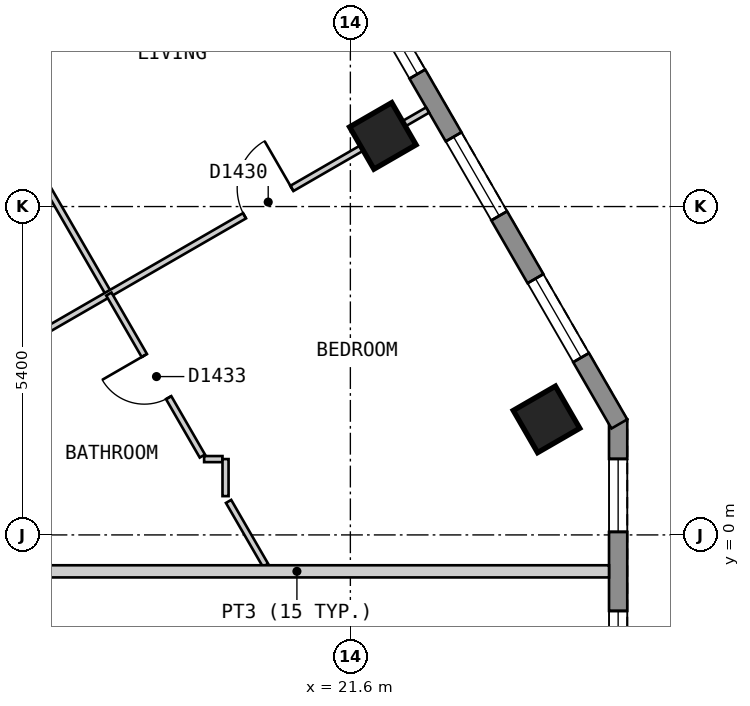
"""IFC4 building model, lengths in metres.
Left out: names, types, materials, properties, quantities, classifications, styles, units other than length and angle.
Written with IfcOpenShell. Run it as: python <this file> out.ifc"""

import sys

from ifc_helpers import new_model, si_unit, direction, frame, frame_2d, origin, origin_2d, place, context, subcontext, project, spatial, polyline, rectangle, outline, extrude, element, fill, save


model = new_model("IFC4")
c1 = context("Model", 3, precision=1e-05, world=origin(), true_north=direction((0.0, 1.0)))
c2 = subcontext(c1, "Body", "Model", "MODEL_VIEW")
j1 = project(units=[si_unit("LENGTHUNIT", "METRE"), si_unit("PLANEANGLEUNIT", "RADIAN")], contexts=[c1])
p1 = place(None, origin())
s1 = spatial("IfcSite", under=j1, at=p1, CompositionType="ELEMENT")
p2 = place(p1, origin())
s2 = spatial("IfcBuilding", under=s1, at=p2, CompositionType="ELEMENT")
p3 = place(p2, frame((0.0, 0.0, 166.2)))
s3 = spatial("IfcBuildingStorey", under=s2, at=p3, CompositionType="ELEMENT", Elevation=166.2)
for number, where, z_axis, x_axis in (
    (1, (24.826, 1.9, 0.0), (0.0, 0.0, 1.0), (-0.5, 0.866, 0.0)),
    (2, (22.134, 6.562, 0.0), (0.0, 0.0, 1.0), (-0.5, 0.866, 0.0)),
):
    element("IfcColumn", number, at=place(p3, frame(where, z_axis=z_axis, x_axis=x_axis)), inside=s3, PredefinedType="COLUMN", context=c2, shape_type="SweptSolid", body=[
        extrude(rectangle(XDim=0.8, YDim=0.8, at=origin_2d()), origin(), (0.0, 0.0, 1.0), 3.0),
    ])
p4 = place(p3, frame((26.004, -3.1, 0.0), z_axis=(0.0, 0.0, 1.0), x_axis=(0.0, 1.0, 0.0)))
e3 = element("IfcWall", 3, at=p4, inside=s3, PredefinedType="SOLIDWALL", context=c2, shape_type="SweptSolid", body=[
    extrude(outline(polyline([(0.0, -0.15), (5.0, -0.15), (4.92, 0.15), (0.08, 0.15), (0.0, -0.15)])), origin(), (0.0, 0.0, 1.0), 2.7),
])
p5 = place(p4, frame((0.65, 0.0, 0.15)))
e4 = element("IfcOpeningElement", 4, at=p5, cuts=e3, PredefinedType="OPENING", context=c2, shape_type="SweptSolid", body=[
    extrude(rectangle(XDim=1.2, YDim=2.1, at=frame_2d((0.6, 1.05))), frame((0.0, 0.16, 0.0), z_axis=(0.0, -1.0, 0.0), x_axis=(1.0, 0.0, 0.0)), (0.0, 0.0, 1.0), 0.32),
])
p6 = place(p4, frame((3.15, 0.0, 0.15)))
e5 = element("IfcOpeningElement", 5, at=p6, cuts=e3, PredefinedType="OPENING", context=c2, shape_type="SweptSolid", body=[
    extrude(rectangle(XDim=1.2, YDim=2.1, at=frame_2d((0.6, 1.05))), frame((0.0, 0.16, 0.0), z_axis=(0.0, -1.0, 0.0), x_axis=(1.0, 0.0, 0.0)), (0.0, 0.0, 1.0), 0.32),
])
p7 = place(p3, frame((26.024, 1.825, 0.0), z_axis=(0.0, 0.0, 1.0), x_axis=(-0.500010537973, 0.866019319597, 0.0)))
e6 = element("IfcWall", 6, at=p7, inside=s3, PredefinedType="SOLIDWALL", context=c2, shape_type="SweptSolid", body=[
    extrude(outline(polyline([(0.0, -0.15), (22.863, -0.15), (22.783, 0.15), (0.08, 0.15), (0.0, -0.15)])), origin(), (0.0, 0.0, 1.0), 2.7),
])
p8 = place(p7, frame((1.259, 0.0, 0.15)))
e7 = element("IfcOpeningElement", 7, at=p8, cuts=e6, PredefinedType="OPENING", context=c2, shape_type="SweptSolid", body=[
    extrude(rectangle(XDim=1.5, YDim=2.1, at=frame_2d((0.75, 1.05))), frame((0.0, 0.16, 0.0), z_axis=(0.0, -1.0, 0.0), x_axis=(1.0, 0.0, 0.0)), (0.0, 0.0, 1.0), 0.32),
])
p9 = place(p7, frame((3.952, 0.0, 0.15)))
e8 = element("IfcOpeningElement", 8, at=p9, cuts=e6, PredefinedType="OPENING", context=c2, shape_type="SweptSolid", body=[
    extrude(rectangle(XDim=1.5, YDim=2.1, at=frame_2d((0.75, 1.05))), frame((0.0, 0.16, 0.0), z_axis=(0.0, -1.0, 0.0), x_axis=(1.0, 0.0, 0.0)), (0.0, 0.0, 1.0), 0.32),
])
p10 = place(p7, frame((6.644, 0.0, 0.15)))
e9 = element("IfcOpeningElement", 9, at=p10, cuts=e6, PredefinedType="OPENING", context=c2, shape_type="SweptSolid", body=[
    extrude(rectangle(XDim=1.5, YDim=2.1, at=frame_2d((0.75, 1.05))), frame((0.0, 0.16, 0.0), z_axis=(0.0, -1.0, 0.0), x_axis=(1.0, 0.0, 0.0)), (0.0, 0.0, 1.0), 0.32),
])
p11 = place(p7, frame((9.335, 0.0, 0.15)))
e10 = element("IfcOpeningElement", 10, at=p11, cuts=e6, PredefinedType="OPENING", context=c2, shape_type="SweptSolid", body=[
    extrude(rectangle(XDim=1.5, YDim=2.1, at=frame_2d((0.75, 1.05))), frame((0.0, 0.16, 0.0), z_axis=(0.0, -1.0, 0.0), x_axis=(1.0, 0.0, 0.0)), (0.0, 0.0, 1.0), 0.32),
])
p12 = place(p7, frame((12.028, 0.0, 0.15)))
e11 = element("IfcOpeningElement", 11, at=p12, cuts=e6, PredefinedType="OPENING", context=c2, shape_type="SweptSolid", body=[
    extrude(rectangle(XDim=1.5, YDim=2.1, at=frame_2d((0.75, 1.05))), frame((0.0, 0.16, 0.0), z_axis=(0.0, -1.0, 0.0), x_axis=(1.0, 0.0, 0.0)), (0.0, 0.0, 1.0), 0.32),
])
p13 = place(p7, frame((14.72, 0.0, 0.15)))
e12 = element("IfcOpeningElement", 12, at=p13, cuts=e6, PredefinedType="OPENING", context=c2, shape_type="SweptSolid", body=[
    extrude(rectangle(XDim=1.5, YDim=2.1, at=frame_2d((0.75, 1.05))), frame((0.0, 0.16, 0.0), z_axis=(0.0, -1.0, 0.0), x_axis=(1.0, 0.0, 0.0)), (0.0, 0.0, 1.0), 0.32),
])
p14 = place(p7, frame((17.411, 0.0, 0.15)))
e13 = element("IfcOpeningElement", 13, at=p14, cuts=e6, PredefinedType="OPENING", context=c2, shape_type="SweptSolid", body=[
    extrude(rectangle(XDim=1.5, YDim=2.1, at=frame_2d((0.75, 1.05))), frame((0.0, 0.16, 0.0), z_axis=(0.0, -1.0, 0.0), x_axis=(1.0, 0.0, 0.0)), (0.0, 0.0, 1.0), 0.32),
])
p15 = place(p7, frame((20.104, 0.0, 0.15)))
e14 = element("IfcOpeningElement", 14, at=p15, cuts=e6, PredefinedType="OPENING", context=c2, shape_type="SweptSolid", body=[
    extrude(rectangle(XDim=1.5, YDim=2.1, at=frame_2d((0.75, 1.05))), frame((0.0, 0.16, 0.0), z_axis=(0.0, -1.0, 0.0), x_axis=(1.0, 0.0, 0.0)), (0.0, 0.0, 1.0), 0.32),
])
p16 = place(p3, frame((15.412, 7.8, 0.0), z_axis=(0.0, 0.0, 1.0), x_axis=(0.499882970317, -0.866092960361, 0.0)))
e15 = element("IfcWall", 15, at=p16, inside=s3, PredefinedType="PARTITIONING", context=c2, shape_type="SweptSolid", body=[
    extrude(rectangle(XDim=4.433, YDim=0.1, at=frame_2d((2.216, 0.0))), origin(), (0.0, 0.0, 1.0), 2.7),
])
p17 = place(p3, frame((19.597, 0.551, 0.0), z_axis=(0.0, 0.0, 1.0), x_axis=(0.500576018574, -0.86569258379, 0.0)))
e16 = element("IfcWall", 16, at=p17, inside=s3, PredefinedType="PARTITIONING", context=c2, shape_type="SweptSolid", body=[
    extrude(rectangle(XDim=1.213, YDim=0.1, at=frame_2d((0.606, 0.0))), origin(), (0.0, 0.0, 1.0), 2.7),
])
p18 = place(p3, frame((19.195, 1.247, 0.0), z_axis=(0.0, 0.0, 1.0), x_axis=(1.0, 0.0, 0.0)))
e17 = element("IfcWall", 17, at=p18, inside=s3, PredefinedType="PARTITIONING", context=c2, shape_type="SweptSolid", body=[
    extrude(rectangle(XDim=0.302, YDim=0.1, at=frame_2d((0.151, 0.0))), origin(), (0.0, 0.0, 1.0), 2.7),
])
p19 = place(p3, frame((19.547, 0.638, 0.0), z_axis=(0.0, 0.0, 1.0), x_axis=(0.0, 1.0, 0.0)))
e18 = element("IfcWall", 18, at=p19, inside=s3, PredefinedType="PARTITIONING", context=c2, shape_type="SweptSolid", body=[
    extrude(rectangle(XDim=0.609, YDim=0.1, at=frame_2d((0.305, 0.0))), origin(), (0.0, 0.0, 1.0), 2.7),
])
p20 = place(p3, frame((14.21, 1.987, 0.0), z_axis=(0.0, 0.0, 1.0), x_axis=(0.866022959057, 0.500004234368, 0.0)))
e19 = element("IfcWall", 19, at=p20, inside=s3, PredefinedType="PARTITIONING", context=c2, shape_type="SweptSolid", body=[
    extrude(rectangle(XDim=10.0, YDim=0.1, at=frame_2d((5.0, 0.0))), origin(), (0.0, 0.0, 1.0), 2.7),
])
p21 = place(p20, frame((6.523, 0.0, 0.0)))
e20 = element("IfcOpeningElement", 20, at=p21, cuts=e19, PredefinedType="OPENING", context=c2, shape_type="SweptSolid", body=[
    extrude(rectangle(XDim=0.9, YDim=2.1, at=frame_2d((0.45, 1.05))), frame((0.0, 0.06, 0.0), z_axis=(0.0, -1.0, 0.0), x_axis=(1.0, 0.0, 0.0)), (0.0, 0.0, 1.0), 0.12),
])
p22 = place(p3, frame((15.588, -0.599, 0.0), z_axis=(0.0, 0.0, 1.0), x_axis=(1.0, 0.0, 0.0)))
e21 = element("IfcWall", 21, at=p22, inside=s3, PredefinedType="PARTITIONING", context=c2, shape_type="SweptSolid", body=[
    extrude(rectangle(XDim=10.266, YDim=0.2, at=frame_2d((5.133, 0.0))), origin(), (0.0, 0.0, 1.0), 2.7),
])
p23 = place(p3, frame((17.628, 3.961, 0.0), z_axis=(0.0, 0.0, 1.0), x_axis=(0.50003162148, -0.866007146345, 0.0)))
e22 = element("IfcWall", 22, at=p23, inside=s3, PredefinedType="PARTITIONING", context=c2, shape_type="SweptSolid", body=[
    extrude(rectangle(XDim=3.076, YDim=0.1, at=frame_2d((1.538, 0.0))), origin(), (0.0, 0.0, 1.0), 2.7),
])
p24 = place(p23, frame((1.167, 0.0, 0.0)))
e23 = element("IfcOpeningElement", 23, at=p24, cuts=e22, PredefinedType="OPENING", context=c2, shape_type="SweptSolid", body=[
    extrude(rectangle(XDim=0.8, YDim=2.1, at=frame_2d((0.4, 1.05))), frame((0.0, 0.06, 0.0), z_axis=(0.0, -1.0, 0.0), x_axis=(1.0, 0.0, 0.0)), (0.0, 0.0, 1.0), 0.12),
])
p25 = place(p5, origin())
e24 = element("IfcWindow", 24, at=p25, inside=s3, PartitioningType="SINGLE_PANEL", PredefinedType="WINDOW", context=c2, shape_type="SweptSolid", body=[
    extrude(rectangle(XDim=1.2, YDim=2.1, at=frame_2d((0.6, 1.05))), frame((0.0, 0.03, 0.0), z_axis=(0.0, -1.0, 0.0), x_axis=(1.0, 0.0, 0.0)), (0.0, 0.0, 1.0), 0.06),
])
fill(e4, e24)
p26 = place(p6, origin())
e25 = element("IfcWindow", 25, at=p26, inside=s3, PartitioningType="SINGLE_PANEL", PredefinedType="WINDOW", context=c2, shape_type="SweptSolid", body=[
    extrude(rectangle(XDim=1.2, YDim=2.1, at=frame_2d((0.6, 1.05))), frame((0.0, 0.03, 0.0), z_axis=(0.0, -1.0, 0.0), x_axis=(1.0, 0.0, 0.0)), (0.0, 0.0, 1.0), 0.06),
])
fill(e5, e25)
p27 = place(p8, origin())
e26 = element("IfcWindow", 26, at=p27, inside=s3, PartitioningType="SINGLE_PANEL", PredefinedType="WINDOW", context=c2, shape_type="SweptSolid", body=[
    extrude(rectangle(XDim=1.5, YDim=2.1, at=frame_2d((0.75, 1.05))), frame((0.0, 0.03, 0.0), z_axis=(0.0, -1.0, 0.0), x_axis=(1.0, 0.0, 0.0)), (0.0, 0.0, 1.0), 0.06),
])
fill(e7, e26)
p28 = place(p9, origin())
e27 = element("IfcWindow", 27, at=p28, inside=s3, PartitioningType="SINGLE_PANEL", PredefinedType="WINDOW", context=c2, shape_type="SweptSolid", body=[
    extrude(rectangle(XDim=1.5, YDim=2.1, at=frame_2d((0.75, 1.05))), frame((0.0, 0.03, 0.0), z_axis=(0.0, -1.0, 0.0), x_axis=(1.0, 0.0, 0.0)), (0.0, 0.0, 1.0), 0.06),
])
fill(e8, e27)
p29 = place(p10, origin())
e28 = element("IfcWindow", 28, at=p29, inside=s3, PartitioningType="SINGLE_PANEL", PredefinedType="WINDOW", context=c2, shape_type="SweptSolid", body=[
    extrude(rectangle(XDim=1.5, YDim=2.1, at=frame_2d((0.75, 1.05))), frame((0.0, 0.03, 0.0), z_axis=(0.0, -1.0, 0.0), x_axis=(1.0, 0.0, 0.0)), (0.0, 0.0, 1.0), 0.06),
])
fill(e9, e28)
p30 = place(p21, origin())
e29 = element("IfcDoor", 29, at=p30, inside=s3, OperationType="SINGLE_SWING_RIGHT", PredefinedType="DOOR", context=c2, shape_type="SweptSolid", body=[
    extrude(rectangle(XDim=0.9, YDim=2.1, at=frame_2d((0.45, 1.05))), frame((0.0, 0.025, 0.0), z_axis=(0.0, -1.0, 0.0), x_axis=(1.0, 0.0, 0.0)), (0.0, 0.0, 1.0), 0.05),
])
fill(e20, e29)
p31 = place(p24, origin())
e30 = element("IfcDoor", 30, at=p31, inside=s3, OperationType="SINGLE_SWING_LEFT", PredefinedType="DOOR", context=c2, shape_type="SweptSolid", body=[
    extrude(rectangle(XDim=0.8, YDim=2.1, at=frame_2d((0.4, 1.05))), frame((0.0, 0.025, 0.0), z_axis=(0.0, -1.0, 0.0), x_axis=(1.0, 0.0, 0.0)), (0.0, 0.0, 1.0), 0.05),
])
fill(e23, e30)
save(model, sys.argv[1])
